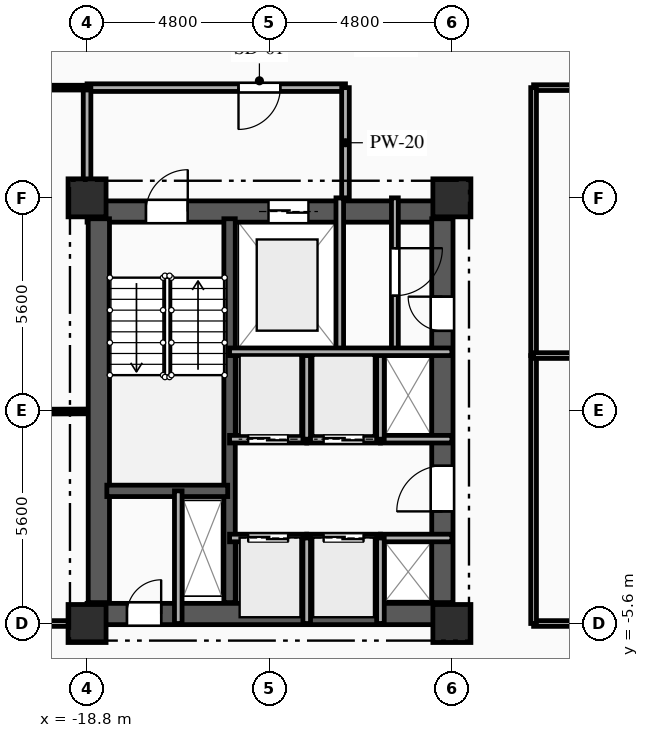
"""IFC4 building model, lengths in metres.
Left out: names, types, materials, properties, quantities, classifications, styles, units other than length and angle.
Written with IfcOpenShell. Run it as: python <this file> out.ifc"""

import sys

from ifc_helpers import new_model, si_unit, direction, frame, frame_2d, origin, origin_2d, place, context, subcontext, project, spatial, rectangle, extrude, element, fill, save


model = new_model("IFC4")
c1 = context("Model", 3, precision=1e-05, world=origin(), true_north=direction((0.0, 1.0)))
c2 = subcontext(c1, "Body", "Model", "MODEL_VIEW")
j1 = project(units=[si_unit("LENGTHUNIT", "METRE"), si_unit("PLANEANGLEUNIT", "RADIAN")], contexts=[c1])
p1 = place(None, origin())
s1 = spatial("IfcSite", under=j1, at=p1, CompositionType="ELEMENT")
p2 = place(p1, origin())
s2 = spatial("IfcBuilding", under=s1, at=p2, CompositionType="ELEMENT")
p3 = place(p2, frame((0.0, 0.0, 92.4)))
s3 = spatial("IfcBuildingStorey", under=s2, at=p3, CompositionType="ELEMENT", Elevation=92.4)
for number, where, z_axis, x_axis in (
    (1, (-18.8, -5.6, 0.0), (0.0, 0.0, 1.0), (1.0, 0.0, 0.0)),
    (2, (-18.8, 5.6, 0.0), (0.0, 0.0, 1.0), (1.0, 0.0, 0.0)),
    (3, (-9.2, -5.6, 0.0), (0.0, 0.0, 1.0), (1.0, 0.0, 0.0)),
    (4, (-9.2, 5.6, 0.0), (0.0, 0.0, 1.0), (1.0, 0.0, 0.0)),
):
    element("IfcColumn", number, at=place(p3, frame(where, z_axis=z_axis, x_axis=x_axis)), inside=s3, PredefinedType="COLUMN", context=c2, shape_type="SweptSolid", body=[
        extrude(rectangle(XDim=1.0, YDim=1.0, at=origin_2d()), origin(), (0.0, 0.0, 1.0), 3.35),
    ])
p4 = place(p3, frame((-18.8, 5.24, 0.0), z_axis=(0.0, 0.0, 1.0), x_axis=(1.0, 0.0, 0.0)))
e5 = element("IfcWall", 5, at=p4, inside=s3, PredefinedType="SHEAR", context=c2, shape_type="SweptSolid", body=[
    extrude(rectangle(XDim=9.6, YDim=0.56, at=frame_2d((4.8, 0.0))), origin(), (0.0, 0.0, 1.0), 3.045),
])
p5 = place(p4, frame((1.55, 0.0, 0.0)))
e6 = element("IfcOpeningElement", 6, at=p5, cuts=e5, PredefinedType="OPENING", context=c2, shape_type="SweptSolid", body=[
    extrude(rectangle(XDim=1.1, YDim=2.15, at=frame_2d((0.55, 1.075))), frame((0.0, 0.29, 0.0), z_axis=(0.0, -1.0, 0.0), x_axis=(1.0, 0.0, 0.0)), (0.0, 0.0, 1.0), 0.58),
])
p6 = place(p4, frame((4.775, 0.0, 0.0)))
e7 = element("IfcOpeningElement", 7, at=p6, cuts=e5, PredefinedType="OPENING", context=c2, shape_type="SweptSolid", body=[
    extrude(rectangle(XDim=1.05, YDim=2.1, at=frame_2d((0.525, 1.05))), frame((0.0, 0.29, 0.0), z_axis=(0.0, -1.0, 0.0), x_axis=(1.0, 0.0, 0.0)), (0.0, 0.0, 1.0), 0.58),
])
p7 = place(p3, frame((-18.8, -5.35, 0.0), z_axis=(0.0, 0.0, 1.0), x_axis=(1.0, 0.0, 0.0)))
e8 = element("IfcWall", 8, at=p7, inside=s3, PredefinedType="SHEAR", context=c2, shape_type="SweptSolid", body=[
    extrude(rectangle(XDim=9.6, YDim=0.56, at=frame_2d((4.8, 0.0))), origin(), (0.0, 0.0, 1.0), 3.045),
])
p8 = place(p7, frame((1.05, 0.0, 0.0)))
e9 = element("IfcOpeningElement", 9, at=p8, cuts=e8, PredefinedType="OPENING", context=c2, shape_type="SweptSolid", body=[
    extrude(rectangle(XDim=0.9, YDim=2.1, at=frame_2d((0.45, 1.05))), frame((0.0, 0.29, 0.0), z_axis=(0.0, -1.0, 0.0), x_axis=(1.0, 0.0, 0.0)), (0.0, 0.0, 1.0), 0.58),
])
p9 = place(p3, frame((-18.49, -5.05, 0.0), z_axis=(0.0, 0.0, 1.0), x_axis=(0.0, 1.0, 0.0)))
e10 = element("IfcWall", 10, at=p9, inside=s3, PredefinedType="SHEAR", context=c2, shape_type="SweptSolid", body=[
    extrude(rectangle(XDim=10.1, YDim=0.56, at=frame_2d((5.05, 0.0))), origin(), (0.0, 0.0, 1.0), 3.045),
])
p10 = place(p3, frame((-9.45, -5.05, 0.0), z_axis=(0.0, 0.0, 1.0), x_axis=(0.0, 1.0, 0.0)))
e11 = element("IfcWall", 11, at=p10, inside=s3, PredefinedType="SHEAR", context=c2, shape_type="SweptSolid", body=[
    extrude(rectangle(XDim=10.1, YDim=0.56, at=frame_2d((5.05, 0.0))), origin(), (0.0, 0.0, 1.0), 3.045),
])
p11 = place(p10, frame((7.15, 0.0, 0.0)))
e12 = element("IfcOpeningElement", 12, at=p11, cuts=e11, PredefinedType="OPENING", context=c2, shape_type="SweptSolid", body=[
    extrude(rectangle(XDim=0.9, YDim=2.1, at=frame_2d((0.45, 1.05))), frame((0.0, 0.29, 0.0), z_axis=(0.0, -1.0, 0.0), x_axis=(1.0, 0.0, 0.0)), (0.0, 0.0, 1.0), 0.58),
])
p12 = place(p10, frame((2.4, 0.0, 0.0)))
e13 = element("IfcOpeningElement", 13, at=p12, cuts=e11, PredefinedType="OPENING", context=c2, shape_type="SweptSolid", body=[
    extrude(rectangle(XDim=1.2, YDim=2.15, at=frame_2d((0.6, 1.075))), frame((0.0, 0.29, 0.0), z_axis=(0.0, -1.0, 0.0), x_axis=(1.0, 0.0, 0.0)), (0.0, 0.0, 1.0), 0.58),
])
p13 = place(p3, frame((-15.05, -5.05, 0.0), z_axis=(0.0, 0.0, 1.0), x_axis=(0.0, 1.0, 0.0)))
e14 = element("IfcWall", 14, at=p13, inside=s3, PredefinedType="SHEAR", context=c2, shape_type="SweptSolid", body=[
    extrude(rectangle(XDim=10.1, YDim=0.3, at=frame_2d((5.05, 0.0))), origin(), (0.0, 0.0, 1.0), 3.045),
])
p14 = place(p3, frame((-18.28, -2.11, 0.0), z_axis=(0.0, 0.0, 1.0), x_axis=(1.0, 0.0, 0.0)))
e15 = element("IfcWall", 15, at=p14, inside=s3, PredefinedType="SHEAR", context=c2, shape_type="SweptSolid", body=[
    extrude(rectangle(XDim=3.18, YDim=0.3, at=frame_2d((1.59, 0.0))), origin(), (0.0, 0.0, 1.0), 3.045),
])
p15 = place(p3, frame((-16.4, -5.6, 0.0), z_axis=(0.0, 0.0, 1.0), x_axis=(0.0, 1.0, 0.0)))
e16 = element("IfcWall", 16, at=p15, inside=s3, PredefinedType="PARTITIONING", context=c2, shape_type="SweptSolid", body=[
    extrude(rectangle(XDim=3.49, YDim=0.2, at=frame_2d((1.745, 0.0))), origin(), (0.0, 0.0, 1.0), 3.045),
])
p16 = place(p3, frame((-12.15, 1.55, 0.0), z_axis=(0.0, 0.0, 1.0), x_axis=(0.0, 1.0, 0.0)))
e17 = element("IfcWall", 17, at=p16, inside=s3, PredefinedType="PARTITIONING", context=c2, shape_type="SweptSolid", body=[
    extrude(rectangle(XDim=4.05, YDim=0.2, at=frame_2d((2.025, 0.0))), origin(), (0.0, 0.0, 1.0), 3.045),
])
p17 = place(p3, frame((-12.0, 8.5, 0.0), z_axis=(0.0, 0.0, 1.0), x_axis=(-1.0, 0.0, 0.0)))
e18 = element("IfcWall", 18, at=p17, inside=s3, PredefinedType="PARTITIONING", context=c2, shape_type="SweptSolid", body=[
    extrude(rectangle(XDim=6.8, YDim=0.2, at=frame_2d((3.4, 0.0))), origin(), (0.0, 0.0, 1.0), 3.045),
])
p18 = place(p17, frame((1.715, 0.0, 0.0)))
e19 = element("IfcOpeningElement", 19, at=p18, cuts=e18, PredefinedType="OPENING", context=c2, shape_type="SweptSolid", body=[
    extrude(rectangle(XDim=1.1, YDim=2.15, at=frame_2d((0.55, 1.075))), frame((0.0, 0.11, 0.0), z_axis=(0.0, -1.0, 0.0), x_axis=(1.0, 0.0, 0.0)), (0.0, 0.0, 1.0), 0.22),
])
p19 = place(p3, frame((-12.0, 5.6, 0.0), z_axis=(0.0, 0.0, 1.0), x_axis=(0.0, 1.0, 0.0)))
e20 = element("IfcWall", 20, at=p19, inside=s3, PredefinedType="PARTITIONING", context=c2, shape_type="SweptSolid", body=[
    extrude(rectangle(XDim=2.9, YDim=0.2, at=frame_2d((1.45, 0.0))), origin(), (0.0, 0.0, 1.0), 3.045),
])
p20 = place(p3, frame((-18.8, 8.5, 0.0), z_axis=(0.0, 0.0, 1.0), x_axis=(0.0, -1.0, 0.0)))
e21 = element("IfcWall", 21, at=p20, inside=s3, PredefinedType="PARTITIONING", context=c2, shape_type="SweptSolid", body=[
    extrude(rectangle(XDim=2.9, YDim=0.2, at=frame_2d((1.45, 0.0))), origin(), (0.0, 0.0, 1.0), 2.53),
])
p21 = place(p3, frame((-10.7, 5.6, 0.0), z_axis=(0.0, 0.0, 1.0), x_axis=(0.0, -1.0, 0.0)))
e22 = element("IfcWall", 22, at=p21, inside=s3, PredefinedType="PARTITIONING", context=c2, shape_type="SweptSolid", body=[
    extrude(rectangle(XDim=4.05, YDim=0.18, at=frame_2d((2.025, 0.0))), origin(), (0.0, 0.0, 1.0), 3.045),
])
p22 = place(p21, frame((1.325, 0.0, 0.0)))
e23 = element("IfcOpeningElement", 23, at=p22, cuts=e22, PredefinedType="OPENING", context=c2, shape_type="SweptSolid", body=[
    extrude(rectangle(XDim=1.25, YDim=2.2, at=frame_2d((0.625, 1.1))), frame((0.0, 0.1, 0.0), z_axis=(0.0, -1.0, 0.0), x_axis=(1.0, 0.0, 0.0)), (0.0, 0.0, 1.0), 0.2),
])
p23 = place(p3, frame((-15.05, -3.35, 0.0), z_axis=(0.0, 0.0, 1.0), x_axis=(1.0, 0.0, 0.0)))
e24 = element("IfcWall", 24, at=p23, inside=s3, PredefinedType="PARTITIONING", context=c2, shape_type="SweptSolid", body=[
    extrude(rectangle(XDim=2.03, YDim=0.2, at=frame_2d((1.015, 0.0))), origin(), (0.0, 0.0, 1.0), 3.045),
])
p24 = place(p23, frame((0.49, 0.0, 0.0)))
e25 = element("IfcOpeningElement", 25, at=p24, cuts=e24, PredefinedType="OPENING", context=c2, shape_type="SweptSolid", body=[
    extrude(rectangle(XDim=1.05, YDim=2.1, at=frame_2d((0.525, 1.05))), frame((0.0, 0.11, 0.0), z_axis=(0.0, -1.0, 0.0), x_axis=(1.0, 0.0, 0.0)), (0.0, 0.0, 1.0), 0.22),
])
p25 = place(p3, frame((-13.02, -3.35, 0.0), z_axis=(0.0, 0.0, 1.0), x_axis=(1.0, 0.0, 0.0)))
e26 = element("IfcWall", 26, at=p25, inside=s3, PredefinedType="PARTITIONING", context=c2, shape_type="SweptSolid", body=[
    extrude(rectangle(XDim=1.94, YDim=0.2, at=frame_2d((0.97, 0.0))), origin(), (0.0, 0.0, 1.0), 3.045),
])
p26 = place(p25, frame((0.445, 0.0, 0.0)))
e27 = element("IfcOpeningElement", 27, at=p26, cuts=e26, PredefinedType="OPENING", context=c2, shape_type="SweptSolid", body=[
    extrude(rectangle(XDim=1.05, YDim=2.1, at=frame_2d((0.525, 1.05))), frame((0.0, 0.11, 0.0), z_axis=(0.0, -1.0, 0.0), x_axis=(1.0, 0.0, 0.0)), (0.0, 0.0, 1.0), 0.22),
])
p27 = place(p3, frame((-11.08, -3.35, 0.0), z_axis=(0.0, 0.0, 1.0), x_axis=(1.0, 0.0, 0.0)))
e28 = element("IfcWall", 28, at=p27, inside=s3, PredefinedType="PARTITIONING", context=c2, shape_type="SweptSolid", body=[
    extrude(rectangle(XDim=1.88, YDim=0.2, at=frame_2d((0.94, 0.0))), origin(), (0.0, 0.0, 1.0), 2.76),
])
p28 = place(p3, frame((-13.02, -0.75, 0.0), z_axis=(0.0, 0.0, 1.0), x_axis=(-1.0, 0.0, 0.0)))
e29 = element("IfcWall", 29, at=p28, inside=s3, PredefinedType="PARTITIONING", context=c2, shape_type="SweptSolid", body=[
    extrude(rectangle(XDim=2.03, YDim=0.2, at=frame_2d((1.015, 0.0))), origin(), (0.0, 0.0, 1.0), 3.045),
])
p29 = place(p28, frame((0.49, 0.0, 0.0)))
e30 = element("IfcOpeningElement", 30, at=p29, cuts=e29, PredefinedType="OPENING", context=c2, shape_type="SweptSolid", body=[
    extrude(rectangle(XDim=1.05, YDim=2.1, at=frame_2d((0.525, 1.05))), frame((0.0, 0.11, 0.0), z_axis=(0.0, -1.0, 0.0), x_axis=(1.0, 0.0, 0.0)), (0.0, 0.0, 1.0), 0.22),
])
p30 = place(p3, frame((-11.08, -0.75, 0.0), z_axis=(0.0, 0.0, 1.0), x_axis=(-1.0, 0.0, 0.0)))
e31 = element("IfcWall", 31, at=p30, inside=s3, PredefinedType="PARTITIONING", context=c2, shape_type="SweptSolid", body=[
    extrude(rectangle(XDim=1.94, YDim=0.2, at=frame_2d((0.97, 0.0))), origin(), (0.0, 0.0, 1.0), 3.045),
])
p31 = place(p30, frame((0.445, 0.0, 0.0)))
e32 = element("IfcOpeningElement", 32, at=p31, cuts=e31, PredefinedType="OPENING", context=c2, shape_type="SweptSolid", body=[
    extrude(rectangle(XDim=1.05, YDim=2.1, at=frame_2d((0.525, 1.05))), frame((0.0, 0.11, 0.0), z_axis=(0.0, -1.0, 0.0), x_axis=(1.0, 0.0, 0.0)), (0.0, 0.0, 1.0), 0.22),
])
p32 = place(p3, frame((-9.2, -0.75, 0.0), z_axis=(0.0, 0.0, 1.0), x_axis=(-1.0, 0.0, 0.0)))
e33 = element("IfcWall", 33, at=p32, inside=s3, PredefinedType="PARTITIONING", context=c2, shape_type="SweptSolid", body=[
    extrude(rectangle(XDim=1.88, YDim=0.2, at=frame_2d((0.94, 0.0))), origin(), (0.0, 0.0, 1.0), 3.045),
])
for number, where, z_axis, x_axis in (
    (34, (-13.02, -5.6, 0.0), (0.0, 0.0, 1.0), (0.0, 1.0, 0.0)),
    (35, (-11.08, -5.6, 0.0), (0.0, 0.0, 1.0), (0.0, 1.0, 0.0)),
):
    element("IfcWall", number, at=place(p3, frame(where, z_axis=z_axis, x_axis=x_axis)), inside=s3, PredefinedType="PARTITIONING", context=c2, shape_type="SweptSolid", body=[
        extrude(rectangle(XDim=2.25, YDim=0.2, at=frame_2d((1.125, 0.0))), origin(), (0.0, 0.0, 1.0), 3.045),
    ])
for number, where, z_axis, x_axis in (
    (36, (-13.02, -0.75, 0.0), (0.0, 0.0, 1.0), (0.0, 1.0, 0.0)),
    (37, (-11.08, -0.75, 0.0), (0.0, 0.0, 1.0), (0.0, 1.0, 0.0)),
):
    element("IfcWall", number, at=place(p3, frame(where, z_axis=z_axis, x_axis=x_axis)), inside=s3, PredefinedType="PARTITIONING", context=c2, shape_type="SweptSolid", body=[
        extrude(rectangle(XDim=2.3, YDim=0.2, at=frame_2d((1.15, 0.0))), origin(), (0.0, 0.0, 1.0), 3.045),
    ])
p33 = place(p3, frame((-18.8, 8.5, 0.0), z_axis=(0.0, 0.0, 1.0), x_axis=(-1.0, 0.0, 0.0)))
e38 = element("IfcWall", 38, at=p33, inside=s3, PredefinedType="PARTITIONING", context=c2, shape_type="SweptSolid", body=[
    extrude(rectangle(XDim=4.2, YDim=0.125, at=frame_2d((2.1, 0.0))), origin(), (0.0, 0.0, 1.0), 3.045),
])
p34 = place(p33, frame((2.409, 0.0, 0.0)))
e39 = element("IfcOpeningElement", 39, at=p34, cuts=e38, PredefinedType="OPENING", context=c2, shape_type="SweptSolid", body=[
    extrude(rectangle(XDim=0.95, YDim=2.1, at=frame_2d((0.475, 1.05))), frame((0.0, 0.073, 0.0), z_axis=(0.0, -1.0, 0.0), x_axis=(1.0, 0.0, 0.0)), (0.0, 0.0, 1.0), 0.145),
])
p35 = place(p3, frame((0.0, 8.5, 0.0), z_axis=(0.0, 0.0, 1.0), x_axis=(-1.0, 0.0, 0.0)))
e40 = element("IfcWall", 40, at=p35, inside=s3, PredefinedType="PARTITIONING", context=c2, shape_type="SweptSolid", body=[
    extrude(rectangle(XDim=7.05, YDim=0.15, at=frame_2d((3.525, 0.0))), origin(), (0.0, 0.0, 1.0), 3.045),
])
p36 = place(p35, frame((1.185, 0.0, 0.0)))
e41 = element("IfcOpeningElement", 41, at=p36, cuts=e40, PredefinedType="OPENING", context=c2, shape_type="SweptSolid", body=[
    extrude(rectangle(XDim=1.05, YDim=2.15, at=frame_2d((0.525, 1.075))), frame((0.0, 0.085, 0.0), z_axis=(0.0, -1.0, 0.0), x_axis=(1.0, 0.0, 0.0)), (0.0, 0.0, 1.0), 0.17),
])
p37 = place(p3, frame((-23.0, -5.6, 0.0), z_axis=(0.0, 0.0, 1.0), x_axis=(1.0, 0.0, 0.0)))
e42 = element("IfcWall", 42, at=p37, inside=s3, PredefinedType="PARTITIONING", context=c2, shape_type="SweptSolid", body=[
    extrude(rectangle(XDim=4.2, YDim=0.15, at=frame_2d((2.1, 0.0))), origin(), (0.0, 0.0, 1.0), 3.045),
])
p38 = place(p37, frame((0.829, 0.0, 0.0)))
e43 = element("IfcOpeningElement", 43, at=p38, cuts=e42, PredefinedType="OPENING", context=c2, shape_type="SweptSolid", body=[
    extrude(rectangle(XDim=1.05, YDim=2.15, at=frame_2d((0.525, 1.075))), frame((0.0, 0.085, 0.0), z_axis=(0.0, -1.0, 0.0), x_axis=(1.0, 0.0, 0.0)), (0.0, 0.0, 1.0), 0.17),
])
p39 = place(p3, frame((-7.05, -5.6, 0.0), z_axis=(0.0, 0.0, 1.0), x_axis=(1.0, 0.0, 0.0)))
e44 = element("IfcWall", 44, at=p39, inside=s3, PredefinedType="PARTITIONING", context=c2, shape_type="SweptSolid", body=[
    extrude(rectangle(XDim=7.05, YDim=0.15, at=frame_2d((3.525, 0.0))), origin(), (0.0, 0.0, 1.0), 2.53),
])
p40 = place(p39, frame((4.815, 0.0, 0.0)))
e45 = element("IfcOpeningElement", 45, at=p40, cuts=e44, PredefinedType="OPENING", context=c2, shape_type="SweptSolid", body=[
    extrude(rectangle(XDim=1.05, YDim=2.15, at=frame_2d((0.525, 1.075))), frame((0.0, 0.085, 0.0), z_axis=(0.0, -1.0, 0.0), x_axis=(1.0, 0.0, 0.0)), (0.0, 0.0, 1.0), 0.17),
])
for number, where, z_axis, x_axis in (
    (46, (-7.05, 1.45, 0.0), (0.0, 0.0, 1.0), (0.0, -1.0, 0.0)),
    (47, (-7.05, 8.5, 0.0), (0.0, 0.0, 1.0), (0.0, -1.0, 0.0)),
):
    element("IfcWall", number, at=place(p3, frame(where, z_axis=z_axis, x_axis=x_axis)), inside=s3, PredefinedType="PARTITIONING", context=c2, shape_type="SweptSolid", body=[
        extrude(rectangle(XDim=7.05, YDim=0.15, at=frame_2d((3.525, 0.0))), origin(), (0.0, 0.0, 1.0), 3.045),
    ])
p41 = place(p3, frame((-28.671, -0.064, 0.0), z_axis=(0.0, 0.0, 1.0), x_axis=(0.999990089865, 0.004451985263, 0.0)))
e48 = element("IfcWall", 48, at=p41, inside=s3, PredefinedType="PARTITIONING", context=c2, shape_type="SweptSolid", body=[
    extrude(rectangle(XDim=9.871, YDim=0.125, at=frame_2d((4.936, 0.0))), origin(), (0.0, 0.0, 1.0), 3.045),
])
p42 = place(p3, frame((-7.05, 1.45, 0.0), z_axis=(0.0, 0.0, 1.0), x_axis=(1.0, 0.0, 0.0)))
e49 = element("IfcWall", 49, at=p42, inside=s3, PredefinedType="PARTITIONING", context=c2, shape_type="SweptSolid", body=[
    extrude(rectangle(XDim=14.1, YDim=0.15, at=frame_2d((7.05, 0.0))), origin(), (0.0, 0.0, 1.0), 3.045),
])
p43 = place(p3, frame((-15.05, 1.55, 0.0), z_axis=(0.0, 0.0, 1.0), x_axis=(1.0, 0.0, 0.0)))
e50 = element("IfcWall", 50, at=p43, inside=s3, PredefinedType="PARTITIONING", context=c2, shape_type="SweptSolid", body=[
    extrude(rectangle(XDim=5.85, YDim=0.2, at=frame_2d((2.925, 0.0))), origin(), (0.0, 0.0, 1.0), 3.045),
])
p44 = place(p5, origin())
e51 = element("IfcDoor", 51, at=p44, inside=s3, OperationType="SINGLE_SWING_RIGHT", PredefinedType="DOOR", context=c2, shape_type="SweptSolid", body=[
    extrude(rectangle(XDim=1.1, YDim=2.15, at=frame_2d((0.55, 1.075))), frame((0.0, 0.025, 0.0), z_axis=(0.0, -1.0, 0.0), x_axis=(1.0, 0.0, 0.0)), (0.0, 0.0, 1.0), 0.05),
])
fill(e6, e51)
p45 = place(p6, origin())
e52 = element("IfcDoor", 52, at=p45, inside=s3, OperationType="DOUBLE_DOOR_SLIDING", PredefinedType="DOOR", context=c2, shape_type="SweptSolid", body=[
    extrude(rectangle(XDim=1.05, YDim=2.1, at=frame_2d((0.525, 1.05))), frame((0.0, 0.025, 0.0), z_axis=(0.0, -1.0, 0.0), x_axis=(1.0, 0.0, 0.0)), (0.0, 0.0, 1.0), 0.05),
])
fill(e7, e52)
p46 = place(p8, origin())
e53 = element("IfcDoor", 53, at=p46, inside=s3, OperationType="SINGLE_SWING_RIGHT", PredefinedType="DOOR", context=c2, shape_type="SweptSolid", body=[
    extrude(rectangle(XDim=0.9, YDim=2.1, at=frame_2d((0.45, 1.05))), frame((0.0, 0.025, 0.0), z_axis=(0.0, -1.0, 0.0), x_axis=(1.0, 0.0, 0.0)), (0.0, 0.0, 1.0), 0.05),
])
fill(e9, e53)
p47 = place(p18, origin())
e54 = element("IfcDoor", 54, at=p47, inside=s3, OperationType="SINGLE_SWING_RIGHT", PredefinedType="DOOR", context=c2, shape_type="SweptSolid", body=[
    extrude(rectangle(XDim=1.1, YDim=2.15, at=frame_2d((0.55, 1.075))), frame((0.0, 0.025, 0.0), z_axis=(0.0, -1.0, 0.0), x_axis=(1.0, 0.0, 0.0)), (0.0, 0.0, 1.0), 0.05),
])
fill(e19, e54)
p48 = place(p22, origin())
e55 = element("IfcDoor", 55, at=p48, inside=s3, OperationType="SINGLE_SWING_LEFT", PredefinedType="DOOR", context=c2, shape_type="SweptSolid", body=[
    extrude(rectangle(XDim=1.25, YDim=2.2, at=frame_2d((0.625, 1.1))), frame((0.0, 0.025, 0.0), z_axis=(0.0, -1.0, 0.0), x_axis=(1.0, 0.0, 0.0)), (0.0, 0.0, 1.0), 0.05),
])
fill(e23, e55)
p49 = place(p11, origin())
e56 = element("IfcDoor", 56, at=p49, inside=s3, OperationType="SINGLE_SWING_RIGHT", PredefinedType="DOOR", context=c2, shape_type="SweptSolid", body=[
    extrude(rectangle(XDim=0.9, YDim=2.1, at=frame_2d((0.45, 1.05))), frame((0.0, 0.025, 0.0), z_axis=(0.0, -1.0, 0.0), x_axis=(1.0, 0.0, 0.0)), (0.0, 0.0, 1.0), 0.05),
])
fill(e12, e56)
p50 = place(p24, origin())
e57 = element("IfcDoor", 57, at=p50, inside=s3, OperationType="DOUBLE_DOOR_SLIDING", PredefinedType="DOOR", context=c2, shape_type="SweptSolid", body=[
    extrude(rectangle(XDim=1.05, YDim=2.1, at=frame_2d((0.525, 1.05))), frame((0.0, 0.025, 0.0), z_axis=(0.0, -1.0, 0.0), x_axis=(1.0, 0.0, 0.0)), (0.0, 0.0, 1.0), 0.05),
])
fill(e25, e57)
p51 = place(p26, origin())
e58 = element("IfcDoor", 58, at=p51, inside=s3, OperationType="DOUBLE_DOOR_SLIDING", PredefinedType="DOOR", context=c2, shape_type="SweptSolid", body=[
    extrude(rectangle(XDim=1.05, YDim=2.1, at=frame_2d((0.525, 1.05))), frame((0.0, 0.025, 0.0), z_axis=(0.0, -1.0, 0.0), x_axis=(1.0, 0.0, 0.0)), (0.0, 0.0, 1.0), 0.05),
])
fill(e27, e58)
p52 = place(p29, origin())
e59 = element("IfcDoor", 59, at=p52, inside=s3, OperationType="DOUBLE_DOOR_SLIDING", PredefinedType="DOOR", context=c2, shape_type="SweptSolid", body=[
    extrude(rectangle(XDim=1.05, YDim=2.1, at=frame_2d((0.525, 1.05))), frame((0.0, 0.025, 0.0), z_axis=(0.0, -1.0, 0.0), x_axis=(1.0, 0.0, 0.0)), (0.0, 0.0, 1.0), 0.05),
])
fill(e30, e59)
p53 = place(p31, origin())
e60 = element("IfcDoor", 60, at=p53, inside=s3, OperationType="DOUBLE_DOOR_SLIDING", PredefinedType="DOOR", context=c2, shape_type="SweptSolid", body=[
    extrude(rectangle(XDim=1.05, YDim=2.1, at=frame_2d((0.525, 1.05))), frame((0.0, 0.025, 0.0), z_axis=(0.0, -1.0, 0.0), x_axis=(1.0, 0.0, 0.0)), (0.0, 0.0, 1.0), 0.05),
])
fill(e32, e60)
p54 = place(p12, origin())
e61 = element("IfcDoor", 61, at=p54, inside=s3, OperationType="SINGLE_SWING_LEFT", PredefinedType="DOOR", context=c2, shape_type="SweptSolid", body=[
    extrude(rectangle(XDim=1.2, YDim=2.15, at=frame_2d((0.6, 1.075))), frame((0.0, 0.025, 0.0), z_axis=(0.0, -1.0, 0.0), x_axis=(1.0, 0.0, 0.0)), (0.0, 0.0, 1.0), 0.05),
])
fill(e13, e61)
save(model, sys.argv[1])
